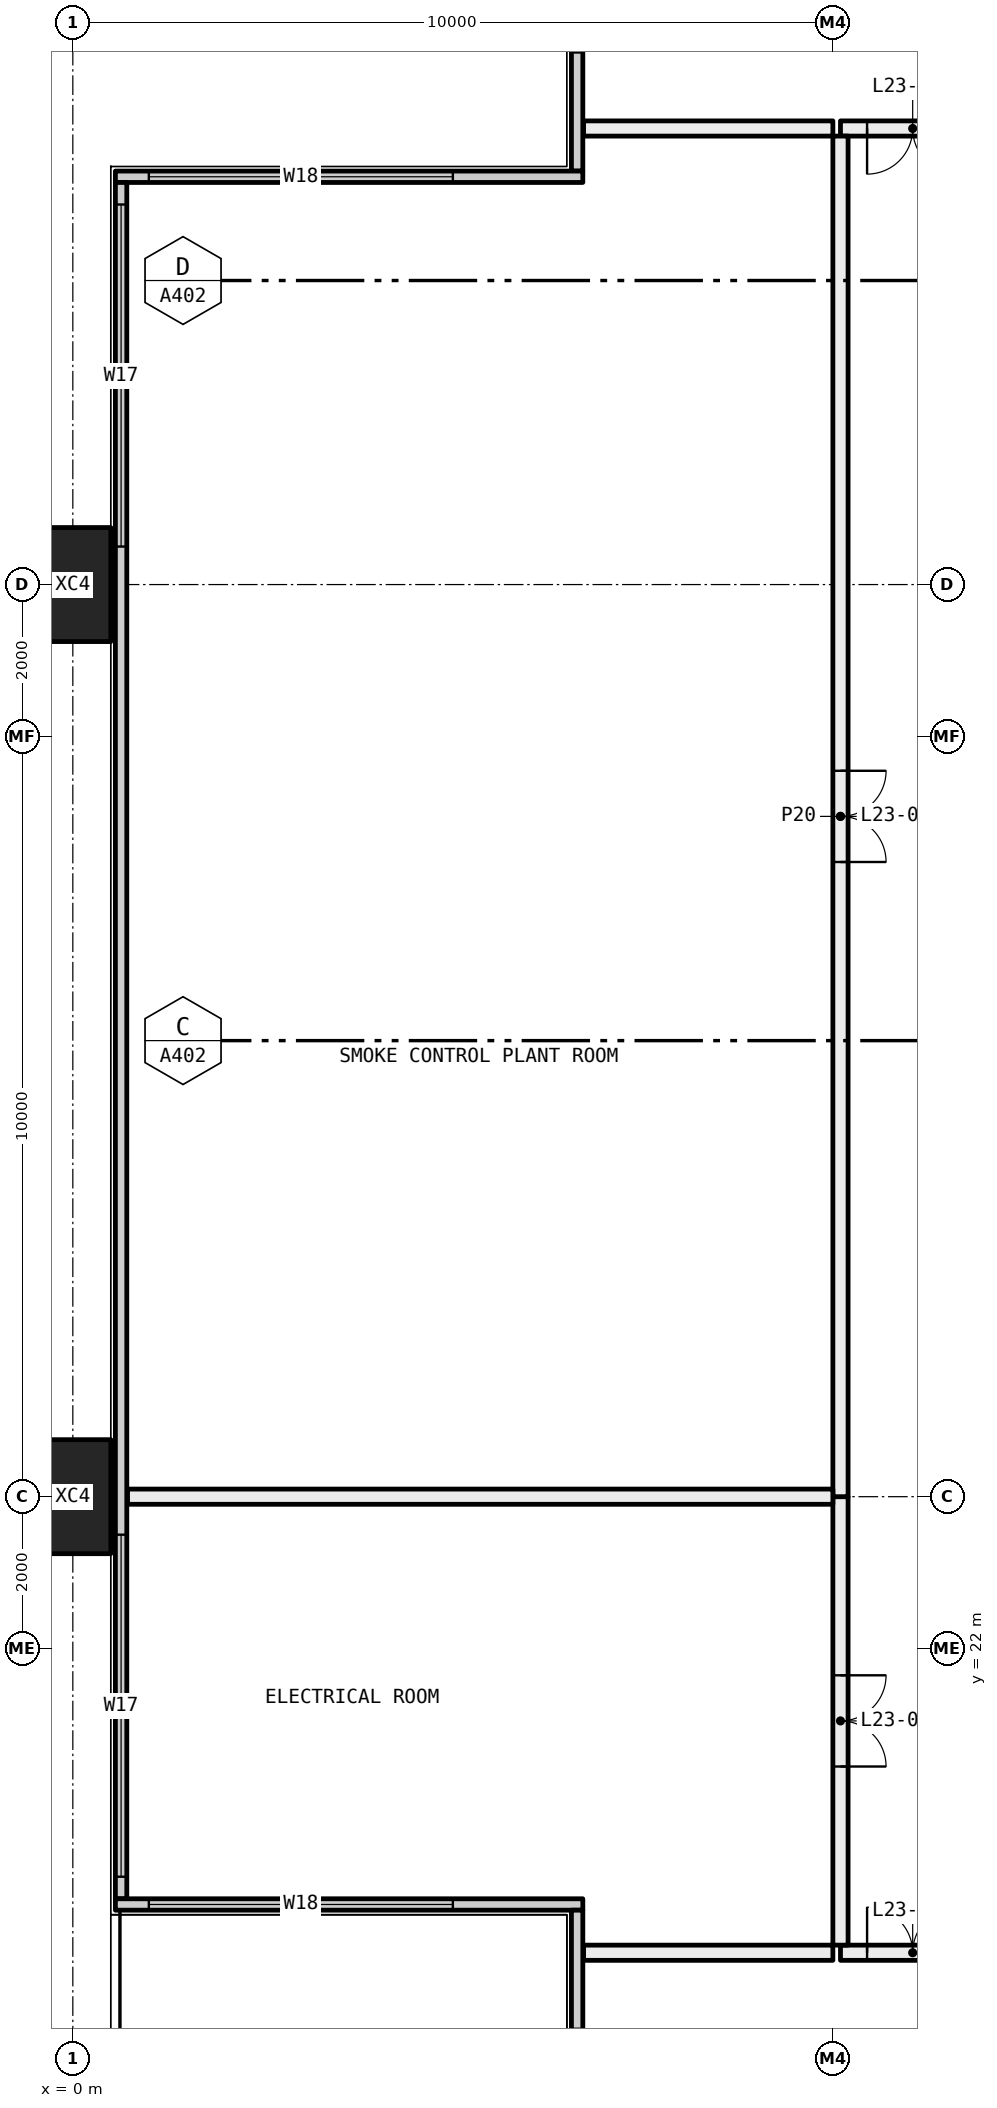
"""IFC4 building model, lengths in metres.
Left out: names, types, materials, properties, quantities, classifications, styles, units other than length and angle.
Written with IfcOpenShell. Run it as: python <this file> out.ifc"""

import sys

from ifc_helpers import new_model, si_unit, direction, frame, frame_2d, origin, origin_2d, place, context, subcontext, project, spatial, rectangle, hollow_rectangle, extrude, element, fill, save


model = new_model("IFC4")
c1 = context("Model", 3, precision=1e-05, world=origin(), true_north=direction((0.0, 1.0)))
c2 = subcontext(c1, "Body", "Model", "MODEL_VIEW")
j1 = project(units=[si_unit("LENGTHUNIT", "METRE"), si_unit("PLANEANGLEUNIT", "RADIAN")], contexts=[c1])
p1 = place(None, origin())
s1 = spatial("IfcSite", under=j1, at=p1, CompositionType="ELEMENT")
p2 = place(p1, origin())
s2 = spatial("IfcBuilding", under=s1, at=p2, CompositionType="ELEMENT")
p3 = place(p2, frame((0.0, 0.0, 92.1)))
s3 = spatial("IfcBuildingStorey", under=s2, at=p3, CompositionType="ELEMENT", Elevation=92.1)
for number, where, z_axis, x_axis in (
    (1, (0.0, 24.0, -0.4), (0.0, 0.0, 1.0), (0.0, 1.0, 0.0)),
    (2, (0.0, 36.0, -0.4), (0.0, 0.0, 1.0), (0.0, 1.0, 0.0)),
):
    element("IfcColumn", number, at=place(p3, frame(where, z_axis=z_axis, x_axis=x_axis)), inside=s3, PredefinedType="COLUMN", context=c2, shape_type="SweptSolid", body=[
        extrude(hollow_rectangle(XDim=1.5, YDim=1.0, WallThickness=0.06, at=origin_2d()), origin(), (0.0, 0.0, 1.0), 4.5),
    ])
p4 = place(p3, frame((6.635, 41.44, 0.0), z_axis=(0.0, 0.0, 1.0), x_axis=(0.0, 1.0, 0.0)))
e3 = element("IfcWall", 3, at=p4, inside=s3, PredefinedType="ELEMENTEDWALL", context=c2, shape_type="SweptSolid", body=[
    extrude(rectangle(XDim=5.85, YDim=0.15, at=frame_2d((2.925, 0.0))), origin(), (0.0, 0.0, 1.0), 4.1),
])
p5 = place(p4, frame((1.56, 0.0, 0.45)))
e4 = element("IfcOpeningElement", 4, at=p5, cuts=e3, PredefinedType="OPENING", context=c2, shape_type="SweptSolid", body=[
    extrude(rectangle(XDim=4.0, YDim=3.6, at=frame_2d((2.0, 1.8))), frame((0.0, 0.085, 0.0), z_axis=(0.0, -1.0, 0.0), x_axis=(1.0, 0.0, 0.0)), (0.0, 0.0, 1.0), 0.17),
])
p6 = place(p3, frame((0.56, 41.365, 0.0), z_axis=(0.0, 0.0, 1.0), x_axis=(1.0, 0.0, 0.0)))
e5 = element("IfcWall", 5, at=p6, inside=s3, PredefinedType="ELEMENTEDWALL", context=c2, shape_type="SweptSolid", body=[
    extrude(rectangle(XDim=6.15, YDim=0.15, at=frame_2d((3.075, 0.0))), origin(), (0.0, 0.0, 1.0), 4.1),
])
p7 = place(p6, frame((0.44, 0.0, 0.45)))
e6 = element("IfcOpeningElement", 6, at=p7, cuts=e5, PredefinedType="OPENING", context=c2, shape_type="SweptSolid", body=[
    extrude(rectangle(XDim=4.0, YDim=3.6, at=frame_2d((2.0, 1.8))), frame((0.0, 0.085, 0.0), z_axis=(0.0, -1.0, 0.0), x_axis=(1.0, 0.0, 0.0)), (0.0, 0.0, 1.0), 0.17),
])
p8 = place(p3, frame((0.635, 18.71, 0.0), z_axis=(0.0, 0.0, 1.0), x_axis=(0.0, 1.0, 0.0)))
e7 = element("IfcWall", 7, at=p8, inside=s3, PredefinedType="ELEMENTEDWALL", context=c2, shape_type="SweptSolid", body=[
    extrude(rectangle(XDim=22.58, YDim=0.15, at=frame_2d((11.29, 0.0))), origin(), (0.0, 0.0, 1.0), 4.1),
])
p9 = place(p8, frame((0.29, 0.0, 0.45)))
e8 = element("IfcOpeningElement", 8, at=p9, cuts=e7, PredefinedType="OPENING", context=c2, shape_type="SweptSolid", body=[
    extrude(rectangle(XDim=4.5, YDim=3.6, at=frame_2d((2.25, 1.8))), frame((0.0, 0.085, 0.0), z_axis=(0.0, -1.0, 0.0), x_axis=(1.0, 0.0, 0.0)), (0.0, 0.0, 1.0), 0.17),
])
p10 = place(p8, frame((17.79, 0.0, 0.45)))
e9 = element("IfcOpeningElement", 9, at=p10, cuts=e7, PredefinedType="OPENING", context=c2, shape_type="SweptSolid", body=[
    extrude(rectangle(XDim=4.5, YDim=3.6, at=frame_2d((2.25, 1.8))), frame((0.0, 0.085, 0.0), z_axis=(0.0, -1.0, 0.0), x_axis=(1.0, 0.0, 0.0)), (0.0, 0.0, 1.0), 0.17),
])
p11 = place(p3, frame((0.56, 18.635, 0.0), z_axis=(0.0, 0.0, 1.0), x_axis=(1.0, 0.0, 0.0)))
e10 = element("IfcWall", 10, at=p11, inside=s3, PredefinedType="ELEMENTEDWALL", context=c2, shape_type="SweptSolid", body=[
    extrude(rectangle(XDim=6.15, YDim=0.15, at=frame_2d((3.075, 0.0))), origin(), (0.0, 0.0, 1.0), 4.1),
])
p12 = place(p11, frame((0.44, 0.0, 0.45)))
e11 = element("IfcOpeningElement", 11, at=p12, cuts=e10, PredefinedType="OPENING", context=c2, shape_type="SweptSolid", body=[
    extrude(rectangle(XDim=4.0, YDim=3.6, at=frame_2d((2.0, 1.8))), frame((0.0, 0.085, 0.0), z_axis=(0.0, -1.0, 0.0), x_axis=(1.0, 0.0, 0.0)), (0.0, 0.0, 1.0), 0.17),
])
p13 = place(p3, frame((6.635, 12.71, 0.0), z_axis=(0.0, 0.0, 1.0), x_axis=(0.0, 1.0, 0.0)))
e12 = element("IfcWall", 12, at=p13, inside=s3, PredefinedType="ELEMENTEDWALL", context=c2, shape_type="SweptSolid", body=[
    extrude(rectangle(XDim=5.85, YDim=0.15, at=frame_2d((2.925, 0.0))), origin(), (0.0, 0.0, 1.0), 4.1),
])
p14 = place(p13, frame((0.29, 0.0, 0.45)))
e13 = element("IfcOpeningElement", 13, at=p14, cuts=e12, PredefinedType="OPENING", context=c2, shape_type="SweptSolid", body=[
    extrude(rectangle(XDim=4.0, YDim=3.6, at=frame_2d((2.0, 1.8))), frame((0.0, 0.085, 0.0), z_axis=(0.0, -1.0, 0.0), x_axis=(1.0, 0.0, 0.0)), (0.0, 0.0, 1.0), 0.17),
])
p15 = place(p3, frame((10.1, 18.0, 0.0), z_axis=(0.0, 0.0, 1.0), x_axis=(1.0, 0.0, 0.0)))
e14 = element("IfcWall", 14, at=p15, inside=s3, PredefinedType="PARTITIONING", context=c2, shape_type="SweptSolid", body=[
    extrude(rectangle(XDim=1.9, YDim=0.2, at=frame_2d((0.95, 0.0))), origin(), (0.0, 0.0, 1.0), 4.1),
])
p16 = place(p15, frame((0.35, 0.0, 0.0)))
e15 = element("IfcOpeningElement", 15, at=p16, cuts=e14, PredefinedType="OPENING", context=c2, shape_type="SweptSolid", body=[
    extrude(rectangle(XDim=1.2, YDim=2.1, at=frame_2d((0.6, 1.05))), frame((0.0, 0.11, 0.0), z_axis=(0.0, -1.0, 0.0), x_axis=(1.0, 0.0, 0.0)), (0.0, 0.0, 1.0), 0.22),
])
p17 = place(p3, frame((12.0, 42.0, 0.0), z_axis=(0.0, 0.0, 1.0), x_axis=(-1.0, 0.0, 0.0)))
e16 = element("IfcWall", 16, at=p17, inside=s3, PredefinedType="PARTITIONING", context=c2, shape_type="SweptSolid", body=[
    extrude(rectangle(XDim=1.9, YDim=0.2, at=frame_2d((0.95, 0.0))), origin(), (0.0, 0.0, 1.0), 4.1),
])
p18 = place(p17, frame((0.35, 0.0, 0.0)))
e17 = element("IfcOpeningElement", 17, at=p18, cuts=e16, PredefinedType="OPENING", context=c2, shape_type="SweptSolid", body=[
    extrude(rectangle(XDim=1.2, YDim=2.1, at=frame_2d((0.6, 1.05))), frame((0.0, 0.11, 0.0), z_axis=(0.0, -1.0, 0.0), x_axis=(1.0, 0.0, 0.0)), (0.0, 0.0, 1.0), 0.22),
])
p19 = place(p3, frame((10.1, 24.0, 0.0), z_axis=(0.0, 0.0, 1.0), x_axis=(0.0, -1.0, 0.0)))
e18 = element("IfcWall", 18, at=p19, inside=s3, PredefinedType="PARTITIONING", context=c2, shape_type="SweptSolid", body=[
    extrude(rectangle(XDim=5.9, YDim=0.2, at=frame_2d((2.95, 0.0))), origin(), (0.0, 0.0, 1.0), 3.5),
])
p20 = place(p19, frame((2.35, 0.0, 0.0)))
e19 = element("IfcOpeningElement", 19, at=p20, cuts=e18, PredefinedType="OPENING", context=c2, shape_type="SweptSolid", body=[
    extrude(rectangle(XDim=1.2, YDim=2.1, at=frame_2d((0.6, 1.05))), frame((0.0, 0.11, 0.0), z_axis=(0.0, -1.0, 0.0), x_axis=(1.0, 0.0, 0.0)), (0.0, 0.0, 1.0), 0.22),
])
p21 = place(p3, frame((10.1, 41.9, 0.0), z_axis=(0.0, 0.0, 1.0), x_axis=(0.0, -1.0, 0.0)))
e20 = element("IfcWall", 20, at=p21, inside=s3, PredefinedType="PARTITIONING", context=c2, shape_type="SweptSolid", body=[
    extrude(rectangle(XDim=17.9, YDim=0.2, at=frame_2d((8.95, 0.0))), origin(), (0.0, 0.0, 1.0), 3.5),
])
p22 = place(p21, frame((8.35, 0.0, 0.0)))
e21 = element("IfcOpeningElement", 21, at=p22, cuts=e20, PredefinedType="OPENING", context=c2, shape_type="SweptSolid", body=[
    extrude(rectangle(XDim=1.2, YDim=2.1, at=frame_2d((0.6, 1.05))), frame((0.0, 0.11, 0.0), z_axis=(0.0, -1.0, 0.0), x_axis=(1.0, 0.0, 0.0)), (0.0, 0.0, 1.0), 0.22),
])
for number, where, z_axis, x_axis in (
    (22, (10.0, 18.0, 0.0), (0.0, 0.0, 1.0), (-1.0, 0.0, 0.0)),
    (23, (6.72, 42.0, 0.0), (0.0, 0.0, 1.0), (1.0, 0.0, 0.0)),
):
    element("IfcWall", number, at=place(p3, frame(where, z_axis=z_axis, x_axis=x_axis)), inside=s3, PredefinedType="PARTITIONING", context=c2, shape_type="SweptSolid", body=[
        extrude(rectangle(XDim=3.28, YDim=0.2, at=frame_2d((1.64, 0.0))), origin(), (0.0, 0.0, 1.0), 4.1),
    ])
p23 = place(p3, frame((10.0, 24.0, 0.0), z_axis=(0.0, 0.0, 1.0), x_axis=(-1.0, 0.0, 0.0)))
e24 = element("IfcWall", 24, at=p23, inside=s3, PredefinedType="PARTITIONING", context=c2, shape_type="SweptSolid", body=[
    extrude(rectangle(XDim=9.28, YDim=0.2, at=frame_2d((4.64, 0.0))), origin(), (0.0, 0.0, 1.0), 3.5),
])
p24 = place(p7, origin())
e25 = element("IfcWindow", 25, at=p24, inside=s3, PartitioningType="SINGLE_PANEL", PredefinedType="WINDOW", context=c2, shape_type="SweptSolid", body=[
    extrude(rectangle(XDim=4.0, YDim=3.6, at=frame_2d((2.0, 1.8))), frame((0.0, 0.03, 0.0), z_axis=(0.0, -1.0, 0.0), x_axis=(1.0, 0.0, 0.0)), (0.0, 0.0, 1.0), 0.06),
])
fill(e6, e25)
p25 = place(p9, origin())
e26 = element("IfcWindow", 26, at=p25, inside=s3, PartitioningType="SINGLE_PANEL", PredefinedType="WINDOW", context=c2, shape_type="SweptSolid", body=[
    extrude(rectangle(XDim=4.5, YDim=3.6, at=frame_2d((2.25, 1.8))), frame((0.0, 0.03, 0.0), z_axis=(0.0, -1.0, 0.0), x_axis=(1.0, 0.0, 0.0)), (0.0, 0.0, 1.0), 0.06),
])
fill(e8, e26)
p26 = place(p10, origin())
e27 = element("IfcWindow", 27, at=p26, inside=s3, PartitioningType="SINGLE_PANEL", PredefinedType="WINDOW", context=c2, shape_type="SweptSolid", body=[
    extrude(rectangle(XDim=4.5, YDim=3.6, at=frame_2d((2.25, 1.8))), frame((0.0, 0.03, 0.0), z_axis=(0.0, -1.0, 0.0), x_axis=(1.0, 0.0, 0.0)), (0.0, 0.0, 1.0), 0.06),
])
fill(e9, e27)
p27 = place(p12, origin())
e28 = element("IfcWindow", 28, at=p27, inside=s3, PartitioningType="SINGLE_PANEL", PredefinedType="WINDOW", context=c2, shape_type="SweptSolid", body=[
    extrude(rectangle(XDim=4.0, YDim=3.6, at=frame_2d((2.0, 1.8))), frame((0.0, 0.03, 0.0), z_axis=(0.0, -1.0, 0.0), x_axis=(1.0, 0.0, 0.0)), (0.0, 0.0, 1.0), 0.06),
])
fill(e11, e28)
p28 = place(p16, origin())
e29 = element("IfcDoor", 29, at=p28, inside=s3, OperationType="DOUBLE_DOOR_SINGLE_SWING", PredefinedType="DOOR", context=c2, shape_type="SweptSolid", body=[
    extrude(rectangle(XDim=1.2, YDim=2.1, at=frame_2d((0.6, 1.05))), frame((0.0, 0.025, 0.0), z_axis=(0.0, -1.0, 0.0), x_axis=(1.0, 0.0, 0.0)), (0.0, 0.0, 1.0), 0.05),
])
fill(e15, e29)
p29 = place(p18, origin())
e30 = element("IfcDoor", 30, at=p29, inside=s3, OperationType="DOUBLE_DOOR_SINGLE_SWING", PredefinedType="DOOR", context=c2, shape_type="SweptSolid", body=[
    extrude(rectangle(XDim=1.2, YDim=2.1, at=frame_2d((0.6, 1.05))), frame((0.0, 0.025, 0.0), z_axis=(0.0, -1.0, 0.0), x_axis=(1.0, 0.0, 0.0)), (0.0, 0.0, 1.0), 0.05),
])
fill(e17, e30)
p30 = place(p20, origin())
e31 = element("IfcDoor", 31, at=p30, inside=s3, OperationType="DOUBLE_DOOR_SINGLE_SWING", PredefinedType="DOOR", context=c2, shape_type="SweptSolid", body=[
    extrude(rectangle(XDim=1.2, YDim=2.1, at=frame_2d((0.6, 1.05))), frame((0.0, 0.025, 0.0), z_axis=(0.0, -1.0, 0.0), x_axis=(1.0, 0.0, 0.0)), (0.0, 0.0, 1.0), 0.05),
])
fill(e19, e31)
p31 = place(p22, origin())
e32 = element("IfcDoor", 32, at=p31, inside=s3, OperationType="DOUBLE_DOOR_SINGLE_SWING", PredefinedType="DOOR", context=c2, shape_type="SweptSolid", body=[
    extrude(rectangle(XDim=1.2, YDim=2.1, at=frame_2d((0.6, 1.05))), frame((0.0, 0.025, 0.0), z_axis=(0.0, -1.0, 0.0), x_axis=(1.0, 0.0, 0.0)), (0.0, 0.0, 1.0), 0.05),
])
fill(e21, e32)
save(model, sys.argv[1])
